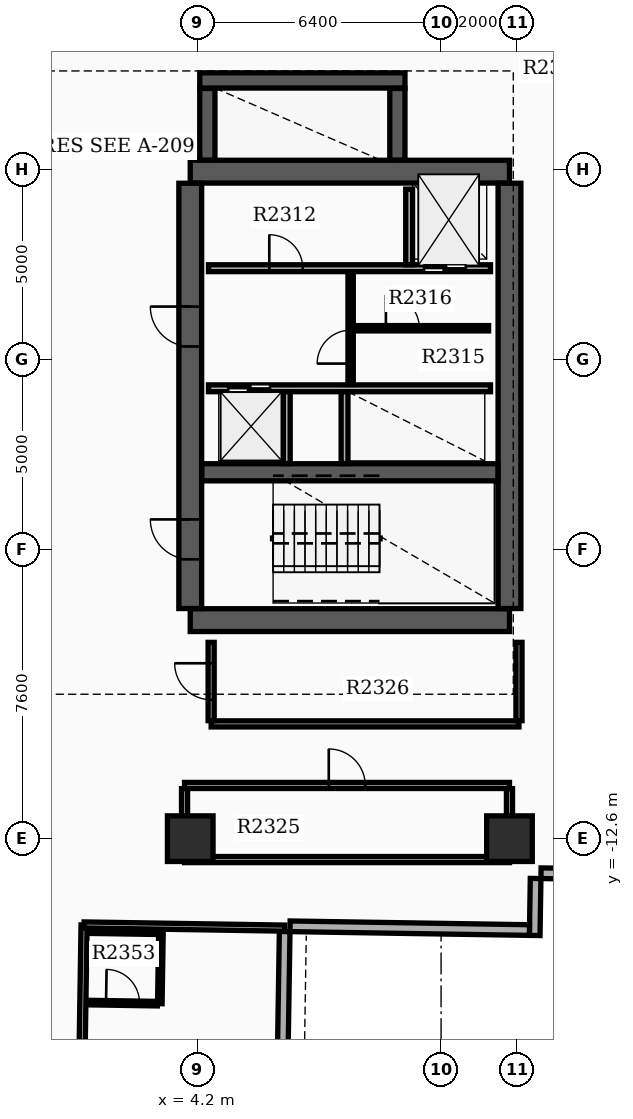
"""IFC4 building model, lengths in metres.
Left out: names, types, materials, properties, quantities, classifications, styles, units other than length and angle.
Written with IfcOpenShell. Run it as: python <this file> out.ifc"""

import sys

from ifc_helpers import new_model, si_unit, direction, frame, frame_2d, origin, origin_2d, place, context, subcontext, project, spatial, rectangle, extrude, element, fill, save


model = new_model("IFC4")
c1 = context("Model", 3, precision=1e-05, world=origin(), true_north=direction((0.0, 1.0)))
c2 = subcontext(c1, "Body", "Model", "MODEL_VIEW")
j1 = project(units=[si_unit("LENGTHUNIT", "METRE"), si_unit("PLANEANGLEUNIT", "RADIAN")], contexts=[c1])
p1 = place(None, origin())
s1 = spatial("IfcSite", under=j1, at=p1, CompositionType="ELEMENT")
p2 = place(p1, origin())
s2 = spatial("IfcBuilding", under=s1, at=p2, CompositionType="ELEMENT")
p3 = place(p2, frame((0.0, 0.0, 148.8)))
s3 = spatial("IfcBuildingStorey", under=s2, at=p3, CompositionType="ELEMENT", Elevation=148.8)
for number, where, z_axis, x_axis in (
    (1, (4.0, -6.85, 0.0), (0.0, 0.0, 1.0), (1.0, 0.0, 0.0)),
    (2, (4.0, 4.95, 0.0), (0.0, 0.0, 1.0), (1.0, 0.0, 0.0)),
):
    element("IfcWall", number, at=place(p3, frame(where, z_axis=z_axis, x_axis=x_axis)), inside=s3, PredefinedType="SHEAR", context=c2, shape_type="SweptSolid", body=[
        extrude(rectangle(XDim=8.4, YDim=0.6, at=frame_2d((4.2, 0.0))), origin(), (0.0, 0.0, 1.0), 3.7),
    ])
p4 = place(p3, frame((4.0, -6.545, 0.0), z_axis=(0.0, 0.0, 1.0), x_axis=(0.0, 1.0, 0.0)))
e3 = element("IfcWall", 3, at=p4, inside=s3, PredefinedType="SHEAR", context=c2, shape_type="SweptSolid", body=[
    extrude(rectangle(XDim=11.19, YDim=0.6, at=frame_2d((5.595, 0.0))), origin(), (0.0, 0.0, 1.0), 3.7),
])
p5 = place(p4, frame((1.295, 0.0, 0.0)))
e4 = element("IfcOpeningElement", 4, at=p5, cuts=e3, PredefinedType="OPENING", context=c2, shape_type="SweptSolid", body=[
    extrude(rectangle(XDim=1.05, YDim=2.15, at=frame_2d((0.525, 1.075))), frame((0.0, 0.31, 0.0), z_axis=(0.0, -1.0, 0.0), x_axis=(1.0, 0.0, 0.0)), (0.0, 0.0, 1.0), 0.62),
])
p6 = place(p4, frame((6.895, 0.0, 0.0)))
e5 = element("IfcOpeningElement", 5, at=p6, cuts=e3, PredefinedType="OPENING", context=c2, shape_type="SweptSolid", body=[
    extrude(rectangle(XDim=1.05, YDim=2.15, at=frame_2d((0.525, 1.075))), frame((0.0, 0.31, 0.0), z_axis=(0.0, -1.0, 0.0), x_axis=(1.0, 0.0, 0.0)), (0.0, 0.0, 1.0), 0.62),
])
p7 = place(p3, frame((12.4, -6.545, 0.0), z_axis=(0.0, 0.0, 1.0), x_axis=(0.0, 1.0, 0.0)))
e6 = element("IfcWall", 6, at=p7, inside=s3, PredefinedType="SHEAR", context=c2, shape_type="SweptSolid", body=[
    extrude(rectangle(XDim=11.19, YDim=0.6, at=frame_2d((5.595, 0.0))), origin(), (0.0, 0.0, 1.0), 3.7),
])
p8 = place(p3, frame((4.305, -2.96, 0.0), z_axis=(0.0, 0.0, 1.0), x_axis=(1.0, 0.0, 0.0)))
e7 = element("IfcWall", 7, at=p8, inside=s3, PredefinedType="SHEAR", context=c2, shape_type="SweptSolid", body=[
    extrude(rectangle(XDim=7.79, YDim=0.45, at=frame_2d((3.895, 0.0))), origin(), (0.0, 0.0, 1.0), 3.7),
])
p9 = place(p3, frame((4.45, 5.255, 0.0), z_axis=(0.0, 0.0, 1.0), x_axis=(0.0, 1.0, 0.0)))
e8 = element("IfcWall", 8, at=p9, inside=s3, PredefinedType="SHEAR", context=c2, shape_type="SweptSolid", body=[
    extrude(rectangle(XDim=1.885, YDim=0.4, at=frame_2d((0.942, 0.0))), origin(), (0.0, 0.0, 1.0), 3.7),
])
p10 = place(p3, frame((4.25, 7.35, 0.0), z_axis=(0.0, 0.0, 1.0), x_axis=(1.0, 0.0, 0.0)))
e9 = element("IfcWall", 9, at=p10, inside=s3, PredefinedType="SHEAR", context=c2, shape_type="SweptSolid", body=[
    extrude(rectangle(XDim=5.4, YDim=0.4, at=frame_2d((2.7, 0.0))), origin(), (0.0, 0.0, 1.0), 3.7),
])
p11 = place(p3, frame((9.45, 5.255, 0.0), z_axis=(0.0, 0.0, 1.0), x_axis=(0.0, 1.0, 0.0)))
e10 = element("IfcWall", 10, at=p11, inside=s3, PredefinedType="SHEAR", context=c2, shape_type="SweptSolid", body=[
    extrude(rectangle(XDim=1.885, YDim=0.4, at=frame_2d((0.942, 0.0))), origin(), (0.0, 0.0, 1.0), 3.7),
])
for number, where, z_axis, x_axis in (
    (11, (12.4, -12.6, 0.0), (0.0, 0.0, 1.0), (1.0, 0.0, 0.0)),
    (12, (4.0, -12.6, 0.0), (0.0, 0.0, 1.0), (1.0, 0.0, 0.0)),
):
    element("IfcColumn", number, at=place(p3, frame(where, z_axis=z_axis, x_axis=x_axis)), inside=s3, PredefinedType="COLUMN", context=c2, shape_type="SweptSolid", body=[
        extrude(rectangle(XDim=1.2, YDim=1.2, at=origin_2d()), origin(), (0.0, 0.0, 1.0), 3.9),
    ])
p12 = place(p3, frame((6.169, -35.141, 0.0), z_axis=(0.0, 0.0, 1.0), x_axis=(0.01571739401, 0.999876474133, 0.0)))
e13 = element("IfcWall", 13, at=p12, inside=s3, PredefinedType="STANDARD", context=c2, shape_type="SweptSolid", body=[
    extrude(rectangle(XDim=20.1, YDim=0.28, at=frame_2d((10.05, 0.0))), origin(), (0.0, 0.0, 1.0), 2.97),
])
p13 = place(p12, frame((1.6, 0.0, 0.8)))
e14 = element("IfcOpeningElement", 14, at=p13, cuts=e13, PredefinedType="OPENING", context=c2, shape_type="SweptSolid", body=[
    extrude(rectangle(XDim=1.4, YDim=1.6, at=frame_2d((0.7, 0.8))), frame((0.0, 0.15, 0.0), z_axis=(0.0, -1.0, 0.0), x_axis=(1.0, 0.0, 0.0)), (0.0, 0.0, 1.0), 0.3),
])
p14 = place(p12, frame((4.8, 0.0, 0.8)))
e15 = element("IfcOpeningElement", 15, at=p14, cuts=e13, PredefinedType="OPENING", context=c2, shape_type="SweptSolid", body=[
    extrude(rectangle(XDim=1.4, YDim=1.6, at=frame_2d((0.7, 0.8))), frame((0.0, 0.15, 0.0), z_axis=(0.0, -1.0, 0.0), x_axis=(1.0, 0.0, 0.0)), (0.0, 0.0, 1.0), 0.3),
])
p15 = place(p12, frame((8.0, 0.0, 0.8)))
e16 = element("IfcOpeningElement", 16, at=p15, cuts=e13, PredefinedType="OPENING", context=c2, shape_type="SweptSolid", body=[
    extrude(rectangle(XDim=1.4, YDim=1.6, at=frame_2d((0.7, 0.8))), frame((0.0, 0.15, 0.0), z_axis=(0.0, -1.0, 0.0), x_axis=(1.0, 0.0, 0.0)), (0.0, 0.0, 1.0), 0.3),
])
p16 = place(p12, frame((11.2, 0.0, 0.8)))
e17 = element("IfcOpeningElement", 17, at=p16, cuts=e13, PredefinedType="OPENING", context=c2, shape_type="SweptSolid", body=[
    extrude(rectangle(XDim=1.4, YDim=1.6, at=frame_2d((0.7, 0.8))), frame((0.0, 0.15, 0.0), z_axis=(0.0, -1.0, 0.0), x_axis=(1.0, 0.0, 0.0)), (0.0, 0.0, 1.0), 0.3),
])
p17 = place(p3, frame((14.449, -13.529, 0.0), z_axis=(0.0, 0.0, 1.0), x_axis=(-0.999878147354, 0.015610587569, 0.0)))
e18 = element("IfcWall", 18, at=p17, inside=s3, PredefinedType="STANDARD", context=c2, shape_type="SweptSolid", body=[
    extrude(rectangle(XDim=1.22, YDim=0.28, at=frame_2d((0.61, 0.0))), origin(), (0.0, 0.0, 1.0), 2.97),
])
p18 = place(p3, frame((13.087, -13.647, 0.0), z_axis=(0.0, 0.0, 1.0), x_axis=(-0.015785793208, -0.999875396603, 0.0)))
e19 = element("IfcWall", 19, at=p18, inside=s3, PredefinedType="STANDARD", context=c2, shape_type="SweptSolid", body=[
    extrude(rectangle(XDim=1.5, YDim=0.28, at=frame_2d((0.75, 0.0))), origin(), (0.0, 0.0, 1.0), 2.97),
])
p19 = place(p3, frame((12.926, -15.005, 0.0), z_axis=(0.0, 0.0, 1.0), x_axis=(-0.999876823822, 0.015695132501, 0.0)))
e20 = element("IfcWall", 20, at=p19, inside=s3, PredefinedType="STANDARD", context=c2, shape_type="SweptSolid", body=[
    extrude(rectangle(XDim=6.3, YDim=0.28, at=frame_2d((3.15, 0.0))), origin(), (0.0, 0.0, 1.0), 2.97),
])
p20 = place(p3, frame((4.48, 2.41, 0.0), z_axis=(0.0, 0.0, 1.0), x_axis=(1.0, 0.0, 0.0)))
e21 = element("IfcWall", 21, at=p20, inside=s3, PredefinedType="SOLIDWALL", context=c2, shape_type="SweptSolid", body=[
    extrude(rectangle(XDim=7.42, YDim=0.18, at=frame_2d((3.71, 0.0))), origin(), (0.0, 0.0, 1.0), 2.96),
])
p21 = place(p20, frame((5.67, 0.0, 0.0)))
e22 = element("IfcOpeningElement", 22, at=p21, cuts=e21, PredefinedType="OPENING", context=c2, shape_type="SweptSolid", body=[
    extrude(rectangle(XDim=1.1, YDim=2.15, at=frame_2d((0.55, 1.075))), frame((0.0, 0.1, 0.0), z_axis=(0.0, -1.0, 0.0), x_axis=(1.0, 0.0, 0.0)), (0.0, 0.0, 1.0), 0.2),
])
p22 = place(p20, frame((1.6, 0.0, 0.0)))
e23 = element("IfcOpeningElement", 23, at=p22, cuts=e21, PredefinedType="OPENING", context=c2, shape_type="SweptSolid", body=[
    extrude(rectangle(XDim=0.88, YDim=2.1, at=frame_2d((0.44, 1.05))), frame((0.0, 0.1, 0.0), z_axis=(0.0, -1.0, 0.0), x_axis=(1.0, 0.0, 0.0)), (0.0, 0.0, 1.0), 0.2),
])
p23 = place(p3, frame((4.48, -0.75, 0.0), z_axis=(0.0, 0.0, 1.0), x_axis=(1.0, 0.0, 0.0)))
e24 = element("IfcWall", 24, at=p23, inside=s3, PredefinedType="SOLIDWALL", context=c2, shape_type="SweptSolid", body=[
    extrude(rectangle(XDim=7.42, YDim=0.18, at=frame_2d((3.71, 0.0))), origin(), (0.0, 0.0, 1.0), 2.96),
])
p24 = place(p23, frame((0.52, 0.0, 0.0)))
e25 = element("IfcOpeningElement", 25, at=p24, cuts=e24, PredefinedType="OPENING", context=c2, shape_type="SweptSolid", body=[
    extrude(rectangle(XDim=1.1, YDim=2.15, at=frame_2d((0.55, 1.075))), frame((0.0, 0.1, 0.0), z_axis=(0.0, -1.0, 0.0), x_axis=(1.0, 0.0, 0.0)), (0.0, 0.0, 1.0), 0.2),
])
p25 = place(p3, frame((9.76, 2.5, 0.0), z_axis=(0.0, 0.0, 1.0), x_axis=(0.0, 1.0, 0.0)))
e26 = element("IfcWall", 26, at=p25, inside=s3, PredefinedType="SOLIDWALL", context=c2, shape_type="SweptSolid", body=[
    extrude(rectangle(XDim=1.99, YDim=0.18, at=frame_2d((0.995, 0.0))), origin(), (0.0, 0.0, 1.0), 2.96),
])
for number, where, z_axis, x_axis in (
    (27, (6.54, -2.73, 0.0), (0.0, 0.0, 1.0), (0.0, 1.0, 0.0)),
    (28, (8.06, -2.73, 0.0), (0.0, 0.0, 1.0), (0.0, 1.0, 0.0)),
):
    element("IfcWall", number, at=place(p3, frame(where, z_axis=z_axis, x_axis=x_axis)), inside=s3, PredefinedType="SOLIDWALL", context=c2, shape_type="SweptSolid", body=[
        extrude(rectangle(XDim=1.89, YDim=0.18, at=frame_2d((0.945, 0.0))), origin(), (0.0, 0.0, 1.0), 2.96),
    ])
p26 = place(p3, frame((8.22, -0.65, 0.0), z_axis=(0.0, 0.0, 1.0), x_axis=(0.0, 1.0, 0.0)))
e29 = element("IfcWall", 29, at=p26, inside=s3, PredefinedType="SOLIDWALL", context=c2, shape_type="SweptSolid", body=[
    extrude(rectangle(XDim=2.96, YDim=0.14, at=frame_2d((1.48, 0.0))), origin(), (0.0, 0.0, 1.0), 2.96),
])
p27 = place(p26, frame((0.55, 0.0, 0.0)))
e30 = element("IfcOpeningElement", 30, at=p27, cuts=e29, PredefinedType="OPENING", context=c2, shape_type="SweptSolid", body=[
    extrude(rectangle(XDim=0.88, YDim=2.1, at=frame_2d((0.44, 1.05))), frame((0.0, 0.08, 0.0), z_axis=(0.0, -1.0, 0.0), x_axis=(1.0, 0.0, 0.0)), (0.0, 0.0, 1.0), 0.16),
])
p28 = place(p3, frame((8.298, 0.83, 0.0), z_axis=(0.0, 0.0, 1.0), x_axis=(1.0, 0.0, 0.0)))
e31 = element("IfcWall", 31, at=p28, inside=s3, PredefinedType="PARTITIONING", context=c2, shape_type="SweptSolid", body=[
    extrude(rectangle(XDim=3.552, YDim=0.14, at=frame_2d((1.776, 0.0))), origin(), (0.0, 0.0, 1.0), 2.96),
])
p29 = place(p28, frame((0.85, 0.0, 0.0)))
e32 = element("IfcOpeningElement", 32, at=p29, cuts=e31, PredefinedType="OPENING", context=c2, shape_type="SweptSolid", body=[
    extrude(rectangle(XDim=0.88, YDim=2.1, at=frame_2d((0.44, 1.05))), frame((0.0, 0.08, 0.0), z_axis=(0.0, -1.0, 0.0), x_axis=(1.0, 0.0, 0.0)), (0.0, 0.0, 1.0), 0.16),
])
p30 = place(p3, frame((3.85, -13.15, 0.0), z_axis=(0.0, 0.0, 1.0), x_axis=(1.0, 0.0, 0.0)))
e33 = element("IfcWall", 33, at=p30, inside=s3, PredefinedType="PARTITIONING", context=c2, shape_type="SweptSolid", body=[
    extrude(rectangle(XDim=8.55, YDim=0.16, at=frame_2d((4.275, 0.0))), origin(), (0.0, 0.0, 1.0), 2.96),
])
p31 = place(p3, frame((3.85, -11.2, 0.0), z_axis=(0.0, 0.0, 1.0), x_axis=(1.0, 0.0, 0.0)))
e34 = element("IfcWall", 34, at=p31, inside=s3, PredefinedType="PARTITIONING", context=c2, shape_type="SweptSolid", body=[
    extrude(rectangle(XDim=8.55, YDim=0.16, at=frame_2d((4.275, 0.0))), origin(), (0.0, 0.0, 1.0), 2.96),
])
p32 = place(p31, frame((3.795, 0.0, 0.0)))
e35 = element("IfcOpeningElement", 35, at=p32, cuts=e34, PredefinedType="OPENING", context=c2, shape_type="SweptSolid", body=[
    extrude(rectangle(XDim=0.96, YDim=2.15, at=frame_2d((0.48, 1.075))), frame((0.0, 0.09, 0.0), z_axis=(0.0, -1.0, 0.0), x_axis=(1.0, 0.0, 0.0)), (0.0, 0.0, 1.0), 0.18),
])
for number, where, z_axis, x_axis in (
    (36, (3.85, -13.065, 0.0), (0.0, 0.0, 1.0), (0.0, 1.0, 0.0)),
    (37, (12.4, -13.065, 0.0), (0.0, 0.0, 1.0), (0.0, 1.0, 0.0)),
):
    element("IfcWall", number, at=place(p3, frame(where, z_axis=z_axis, x_axis=x_axis)), inside=s3, PredefinedType="PARTITIONING", context=c2, shape_type="SweptSolid", body=[
        extrude(rectangle(XDim=1.78, YDim=0.16, at=frame_2d((0.89, 0.0))), origin(), (0.0, 0.0, 1.0), 2.96),
    ])
p33 = place(p3, frame((4.55, -9.58, 0.0), z_axis=(0.0, 0.0, 1.0), x_axis=(1.0, 0.0, 0.0)))
e38 = element("IfcWall", 38, at=p33, inside=s3, PredefinedType="PARTITIONING", context=c2, shape_type="SweptSolid", body=[
    extrude(rectangle(XDim=8.1, YDim=0.16, at=frame_2d((4.05, 0.0))), origin(), (0.0, 0.0, 1.0), 2.96),
])
p34 = place(p3, frame((4.55, -9.495, 0.0), z_axis=(0.0, 0.0, 1.0), x_axis=(0.0, 1.0, 0.0)))
e39 = element("IfcWall", 39, at=p34, inside=s3, PredefinedType="PARTITIONING", context=c2, shape_type="SweptSolid", body=[
    extrude(rectangle(XDim=2.06, YDim=0.16, at=frame_2d((1.03, 0.0))), origin(), (0.0, 0.0, 1.0), 2.96),
])
p35 = place(p34, frame((0.55, 0.0, 0.0)))
e40 = element("IfcOpeningElement", 40, at=p35, cuts=e39, PredefinedType="OPENING", context=c2, shape_type="SweptSolid", body=[
    extrude(rectangle(XDim=0.96, YDim=2.15, at=frame_2d((0.48, 1.075))), frame((0.0, 0.09, 0.0), z_axis=(0.0, -1.0, 0.0), x_axis=(1.0, 0.0, 0.0)), (0.0, 0.0, 1.0), 0.18),
])
p36 = place(p3, frame((12.65, -9.495, 0.0), z_axis=(0.0, 0.0, 1.0), x_axis=(0.0, 1.0, 0.0)))
e41 = element("IfcWall", 41, at=p36, inside=s3, PredefinedType="PARTITIONING", context=c2, shape_type="SweptSolid", body=[
    extrude(rectangle(XDim=2.06, YDim=0.16, at=frame_2d((1.03, 0.0))), origin(), (0.0, 0.0, 1.0), 2.96),
])
p37 = place(p3, frame((1.207, -14.871, 0.0), z_axis=(0.0, 0.0, 1.0), x_axis=(-0.015713987169, -0.999876527681, 0.0)))
e42 = element("IfcWall", 42, at=p37, inside=s3, PredefinedType="PARTITIONING", context=c2, shape_type="SweptSolid", body=[
    extrude(rectangle(XDim=20.182, YDim=0.16, at=frame_2d((10.091, 0.0))), origin(), (0.0, 0.0, 1.0), 2.96),
])
p38 = place(p37, frame((18.93, 0.0, 0.0)))
e43 = element("IfcOpeningElement", 43, at=p38, cuts=e42, PredefinedType="OPENING", context=c2, shape_type="SweptSolid", body=[
    extrude(rectangle(XDim=0.96, YDim=2.15, at=frame_2d((0.48, 1.075))), frame((0.0, 0.09, 0.0), z_axis=(0.0, -1.0, 0.0), x_axis=(1.0, 0.0, 0.0)), (0.0, 0.0, 1.0), 0.18),
])
p39 = place(p3, frame((1.207, -14.871, 0.0), z_axis=(0.0, 0.0, 1.0), x_axis=(0.999877138082, -0.015675099418, 0.0)))
e44 = element("IfcWall", 44, at=p39, inside=s3, PredefinedType="PARTITIONING", context=c2, shape_type="SweptSolid", body=[
    extrude(rectangle(XDim=5.28, YDim=0.16, at=frame_2d((2.64, 0.0))), origin(), (0.0, 0.0, 1.0), 2.96),
])
p40 = place(p3, frame((1.314, -16.913, 0.0), z_axis=(0.0, 0.0, 1.0), x_axis=(0.999874722342, -0.015828443418, 0.0)))
e45 = element("IfcWall", 45, at=p40, inside=s3, PredefinedType="PARTITIONING", context=c2, shape_type="SweptSolid", body=[
    extrude(rectangle(XDim=1.82, YDim=0.12, at=frame_2d((0.91, 0.0))), origin(), (0.0, 0.0, 1.0), 2.96),
])
p41 = place(p40, frame((0.47, 0.0, 0.0)))
e46 = element("IfcOpeningElement", 46, at=p41, cuts=e45, PredefinedType="OPENING", context=c2, shape_type="SweptSolid", body=[
    extrude(rectangle(XDim=0.88, YDim=2.1, at=frame_2d((0.44, 1.05))), frame((0.0, 0.07, 0.0), z_axis=(0.0, -1.0, 0.0), x_axis=(1.0, 0.0, 0.0)), (0.0, 0.0, 1.0), 0.14),
])
p42 = place(p3, frame((1.344, -15.033, 0.0), z_axis=(0.0, 0.0, 1.0), x_axis=(0.999876836305, -0.015694337248, 0.0)))
e47 = element("IfcWall", 47, at=p42, inside=s3, PredefinedType="PARTITIONING", context=c2, shape_type="SweptSolid", body=[
    extrude(rectangle(XDim=1.82, YDim=0.12, at=frame_2d((0.91, 0.0))), origin(), (0.0, 0.0, 1.0), 2.96),
])
p43 = place(p3, frame((3.229, -15.062, 0.0), z_axis=(0.0, 0.0, 1.0), x_axis=(-0.01571234584, -0.999876553475, 0.0)))
e48 = element("IfcWall", 48, at=p43, inside=s3, PredefinedType="PARTITIONING", context=c2, shape_type="SweptSolid", body=[
    extrude(rectangle(XDim=1.88, YDim=0.12, at=frame_2d((0.94, 0.0))), origin(), (0.0, 0.0, 1.0), 2.96),
])
p44 = place(p5, origin())
e49 = element("IfcDoor", 49, at=p44, inside=s3, OperationType="SINGLE_SWING_RIGHT", PredefinedType="DOOR", context=c2, shape_type="SweptSolid", body=[
    extrude(rectangle(XDim=1.05, YDim=2.15, at=frame_2d((0.525, 1.075))), frame((0.0, 0.025, 0.0), z_axis=(0.0, -1.0, 0.0), x_axis=(1.0, 0.0, 0.0)), (0.0, 0.0, 1.0), 0.05),
])
fill(e4, e49)
p45 = place(p6, origin())
e50 = element("IfcDoor", 50, at=p45, inside=s3, OperationType="SINGLE_SWING_RIGHT", PredefinedType="DOOR", context=c2, shape_type="SweptSolid", body=[
    extrude(rectangle(XDim=1.05, YDim=2.15, at=frame_2d((0.525, 1.075))), frame((0.0, 0.025, 0.0), z_axis=(0.0, -1.0, 0.0), x_axis=(1.0, 0.0, 0.0)), (0.0, 0.0, 1.0), 0.05),
])
fill(e5, e50)
p46 = place(p21, origin())
e51 = element("IfcDoor", 51, at=p46, inside=s3, OperationType="DOUBLE_DOOR_SLIDING", PredefinedType="DOOR", context=c2, shape_type="SweptSolid", body=[
    extrude(rectangle(XDim=1.1, YDim=2.15, at=frame_2d((0.55, 1.075))), frame((0.0, 0.025, 0.0), z_axis=(0.0, -1.0, 0.0), x_axis=(1.0, 0.0, 0.0)), (0.0, 0.0, 1.0), 0.05),
])
fill(e22, e51)
p47 = place(p24, origin())
e52 = element("IfcDoor", 52, at=p47, inside=s3, OperationType="DOUBLE_DOOR_SLIDING", PredefinedType="DOOR", context=c2, shape_type="SweptSolid", body=[
    extrude(rectangle(XDim=1.1, YDim=2.15, at=frame_2d((0.55, 1.075))), frame((0.0, 0.025, 0.0), z_axis=(0.0, -1.0, 0.0), x_axis=(1.0, 0.0, 0.0)), (0.0, 0.0, 1.0), 0.05),
])
fill(e25, e52)
p48 = place(p22, origin())
e53 = element("IfcDoor", 53, at=p48, inside=s3, OperationType="SINGLE_SWING_LEFT", PredefinedType="DOOR", context=c2, shape_type="SweptSolid", body=[
    extrude(rectangle(XDim=0.88, YDim=2.1, at=frame_2d((0.44, 1.05))), frame((0.0, 0.025, 0.0), z_axis=(0.0, -1.0, 0.0), x_axis=(1.0, 0.0, 0.0)), (0.0, 0.0, 1.0), 0.05),
])
fill(e23, e53)
p49 = place(p27, origin())
e54 = element("IfcDoor", 54, at=p49, inside=s3, OperationType="SINGLE_SWING_LEFT", PredefinedType="DOOR", context=c2, shape_type="SweptSolid", body=[
    extrude(rectangle(XDim=0.88, YDim=2.1, at=frame_2d((0.44, 1.05))), frame((0.0, 0.025, 0.0), z_axis=(0.0, -1.0, 0.0), x_axis=(1.0, 0.0, 0.0)), (0.0, 0.0, 1.0), 0.05),
])
fill(e30, e54)
p50 = place(p29, origin())
e55 = element("IfcDoor", 55, at=p50, inside=s3, OperationType="SINGLE_SWING_LEFT", PredefinedType="DOOR", context=c2, shape_type="SweptSolid", body=[
    extrude(rectangle(XDim=0.88, YDim=2.1, at=frame_2d((0.44, 1.05))), frame((0.0, 0.025, 0.0), z_axis=(0.0, -1.0, 0.0), x_axis=(1.0, 0.0, 0.0)), (0.0, 0.0, 1.0), 0.05),
])
fill(e32, e55)
p51 = place(p32, origin())
e56 = element("IfcDoor", 56, at=p51, inside=s3, OperationType="SINGLE_SWING_LEFT", PredefinedType="DOOR", context=c2, shape_type="SweptSolid", body=[
    extrude(rectangle(XDim=0.96, YDim=2.15, at=frame_2d((0.48, 1.075))), frame((0.0, 0.025, 0.0), z_axis=(0.0, -1.0, 0.0), x_axis=(1.0, 0.0, 0.0)), (0.0, 0.0, 1.0), 0.05),
])
fill(e35, e56)
p52 = place(p35, origin())
e57 = element("IfcDoor", 57, at=p52, inside=s3, OperationType="SINGLE_SWING_RIGHT", PredefinedType="DOOR", context=c2, shape_type="SweptSolid", body=[
    extrude(rectangle(XDim=0.96, YDim=2.15, at=frame_2d((0.48, 1.075))), frame((0.0, 0.025, 0.0), z_axis=(0.0, -1.0, 0.0), x_axis=(1.0, 0.0, 0.0)), (0.0, 0.0, 1.0), 0.05),
])
fill(e40, e57)
p53 = place(p41, origin())
e58 = element("IfcDoor", 58, at=p53, inside=s3, OperationType="SINGLE_SWING_LEFT", PredefinedType="DOOR", context=c2, shape_type="SweptSolid", body=[
    extrude(rectangle(XDim=0.88, YDim=2.1, at=frame_2d((0.44, 1.05))), frame((0.0, 0.025, 0.0), z_axis=(0.0, -1.0, 0.0), x_axis=(1.0, 0.0, 0.0)), (0.0, 0.0, 1.0), 0.05),
])
fill(e46, e58)
save(model, sys.argv[1])
